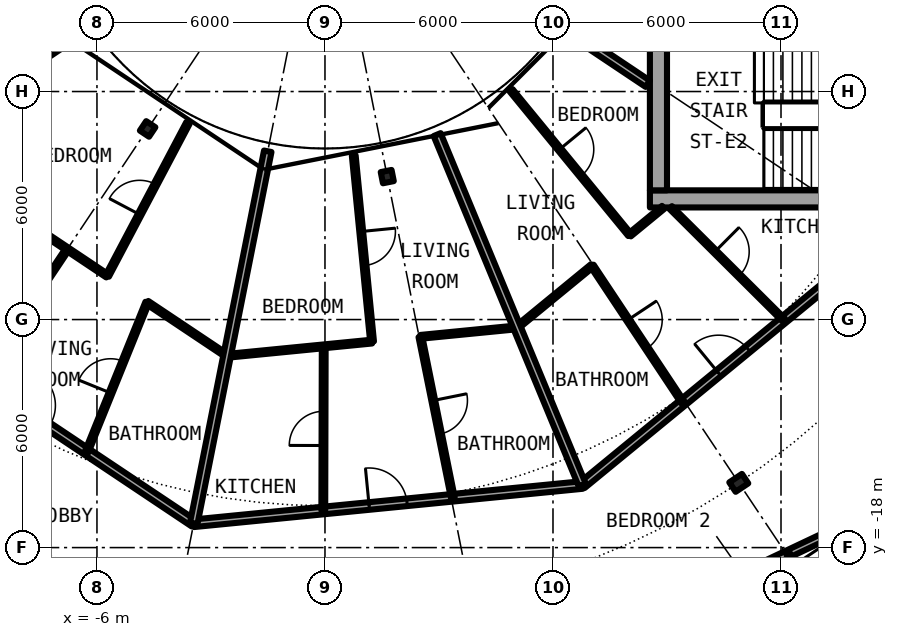
"""IFC4 building model, lengths in metres.
Left out: names, types, materials, properties, quantities, classifications, styles, units other than length and angle.
Written with IfcOpenShell. Run it as: python <this file> out.ifc"""

import sys

from ifc_helpers import new_model, si_unit, direction, frame, frame_2d, origin, origin_2d, place, context, subcontext, project, spatial, rectangle, i_section, extrude, element, fill, save


model = new_model("IFC4")
c1 = context("Model", 3, precision=1e-05, world=origin(), true_north=direction((0.0, 1.0)))
c2 = subcontext(c1, "Body", "Model", "MODEL_VIEW")
j1 = project(units=[si_unit("LENGTHUNIT", "METRE"), si_unit("PLANEANGLEUNIT", "RADIAN")], contexts=[c1])
p1 = place(None, origin())
s1 = spatial("IfcSite", under=j1, at=p1, CompositionType="ELEMENT")
p2 = place(p1, origin())
s2 = spatial("IfcBuilding", under=s1, at=p2, CompositionType="ELEMENT")
p3 = place(p2, frame((0.0, 0.0, 212.7)))
s3 = spatial("IfcBuildingStorey", under=s2, at=p3, CompositionType="ELEMENT", Elevation=212.7)
p4 = place(p3, frame((10.889, -16.297, 0.0), z_axis=(0.0, 0.0, 1.0), x_axis=(0.55557023302, -0.831469612303, 0.0)))
e1 = element("IfcColumn", 1, at=p4, inside=s3, PredefinedType="COLUMN", context=c2, shape_type="SweptSolid", body=[
    extrude(i_section(OverallWidth=0.3, OverallDepth=0.4, WebThickness=0.013, FlangeThickness=0.024, FilletRadius=0.027, at=origin_2d()), origin(), (0.0, 0.0, 1.0), 3.05),
])
for number, where, z_axis, x_axis in (
    (2, (-4.667, -6.984, 0.0), (0.0, 0.0, 1.0), (-0.556, -0.831, 0.0)),
    (3, (1.639, -8.239, 0.0), (0.0, 0.0, 1.0), (0.195, -0.981, 0.0)),
):
    element("IfcColumn", number, at=place(p3, frame(where, z_axis=z_axis, x_axis=x_axis)), inside=s3, PredefinedType="COLUMN", context=c2, shape_type="SweptSolid", body=[
        extrude(i_section(OverallWidth=0.3, OverallDepth=0.29, WebThickness=0.009, FlangeThickness=0.014, FilletRadius=0.027, at=origin_2d()), origin(), (0.0, 0.0, 1.0), 3.05),
    ])
p5 = place(p3, frame((8.55, -8.825, 0.0), z_axis=(0.0, 0.0, 1.0), x_axis=(1.0, 0.0, 0.0)))
e4 = element("IfcWall", 4, at=p5, inside=s3, PredefinedType="SHEAR", context=c2, shape_type="SweptSolid", body=[
    extrude(rectangle(XDim=13.5, YDim=0.45, at=frame_2d((6.75, 0.0))), origin(), (0.0, 0.0, 1.0), 3.05),
])
p6 = place(p5, frame((11.325, 0.0, 0.0)))
e5 = element("IfcOpeningElement", 5, at=p6, cuts=e4, PredefinedType="OPENING", context=c2, shape_type="SweptSolid", body=[
    extrude(rectangle(XDim=1.2, YDim=2.3, at=frame_2d((0.6, 1.15))), frame((0.0, 0.235, 0.0), z_axis=(0.0, -1.0, 0.0), x_axis=(1.0, 0.0, 0.0)), (0.0, 0.0, 1.0), 0.47),
])
p7 = place(p3, frame((8.775, -8.6, 0.0), z_axis=(0.0, 0.0, 1.0), x_axis=(0.0, 1.0, 0.0)))
e6 = element("IfcWall", 6, at=p7, inside=s3, PredefinedType="SHEAR", context=c2, shape_type="SweptSolid", body=[
    extrude(rectangle(XDim=17.2, YDim=0.45, at=frame_2d((8.6, 0.0))), origin(), (0.0, 0.0, 1.0), 3.05),
])
p8 = place(p7, frame((7.4, 0.0, 0.1)))
e7 = element("IfcOpeningElement", 7, at=p8, cuts=e6, PredefinedType="OPENING", context=c2, shape_type="SweptSolid", body=[
    extrude(rectangle(XDim=2.4, YDim=2.2, at=frame_2d((1.2, 1.1))), frame((0.0, 0.235, 0.0), z_axis=(0.0, -1.0, 0.0), x_axis=(1.0, 0.0, 0.0)), (0.0, 0.0, 1.0), 0.47),
])
p9 = place(p3, frame((4.352, -21.873, 0.0), z_axis=(0.0, 0.0, 1.0), x_axis=(0.903903349022, 0.427736759733, 0.0)))
e8 = element("IfcWall", 8, at=p9, inside=s3, PredefinedType="PARTITIONING", context=c2, shape_type="SweptSolid", body=[
    extrude(rectangle(XDim=10.838, YDim=0.2, at=frame_2d((5.419, 0.0))), origin(), (0.0, 0.0, 1.0), 2.7),
])
p10 = place(p9, frame((4.92, 0.0, 0.0)))
e9 = element("IfcOpeningElement", 9, at=p10, cuts=e8, PredefinedType="OPENING", context=c2, shape_type="SweptSolid", body=[
    extrude(rectangle(XDim=1.0, YDim=2.3, at=frame_2d((0.5, 1.15))), frame((0.0, 0.11, 0.0), z_axis=(0.0, -1.0, 0.0), x_axis=(1.0, 0.0, 0.0)), (0.0, 0.0, 1.0), 0.22),
])
p11 = place(p3, frame((-3.454, -17.36, 0.0), z_axis=(0.0, 0.0, 1.0), x_axis=(0.995189328429, 0.097970406658, 0.0)))
e10 = element("IfcWall", 10, at=p11, inside=s3, PredefinedType="PARTITIONING", context=c2, shape_type="SweptSolid", body=[
    extrude(rectangle(XDim=10.28, YDim=0.2, at=frame_2d((5.14, 0.0))), origin(), (0.0, 0.0, 1.0), 2.7),
])
p12 = place(p11, frame((4.639, 0.0, 0.0)))
e11 = element("IfcOpeningElement", 11, at=p12, cuts=e10, PredefinedType="OPENING", context=c2, shape_type="SweptSolid", body=[
    extrude(rectangle(XDim=1.0, YDim=2.3, at=frame_2d((0.5, 1.15))), frame((0.0, 0.11, 0.0), z_axis=(0.0, -1.0, 0.0), x_axis=(1.0, 0.0, 0.0)), (0.0, 0.0, 1.0), 0.22),
])
p13 = place(p3, frame((6.773, -16.353, 0.0), z_axis=(0.0, 0.0, 1.0), x_axis=(0.773034536097, 0.634363938131, 0.0)))
e12 = element("IfcWall", 12, at=p13, inside=s3, PredefinedType="PARTITIONING", context=c2, shape_type="SweptSolid", body=[
    extrude(rectangle(XDim=10.277, YDim=0.2, at=frame_2d((5.138, 0.0))), origin(), (0.0, 0.0, 1.0), 2.7),
])
p14 = place(p13, frame((4.638, 0.0, 0.0)))
e13 = element("IfcOpeningElement", 13, at=p14, cuts=e12, PredefinedType="OPENING", context=c2, shape_type="SweptSolid", body=[
    extrude(rectangle(XDim=1.0, YDim=2.3, at=frame_2d((0.5, 1.15))), frame((0.0, 0.11, 0.0), z_axis=(0.0, -1.0, 0.0), x_axis=(1.0, 0.0, 0.0)), (0.0, 0.0, 1.0), 0.22),
])
p15 = place(p3, frame((-14.717, -9.834, 0.0), z_axis=(0.0, 0.0, 1.0), x_axis=(0.831492679744, -0.555535708603, 0.0)))
e14 = element("IfcWall", 14, at=p15, inside=s3, PredefinedType="PARTITIONING", context=c2, shape_type="SweptSolid", body=[
    extrude(rectangle(XDim=13.549, YDim=0.2, at=frame_2d((6.775, 0.0))), origin(), (0.0, 0.0, 1.0), 2.7),
])
p16 = place(p15, frame((7.966, 0.0, 0.0)))
e15 = element("IfcOpeningElement", 15, at=p16, cuts=e14, PredefinedType="OPENING", context=c2, shape_type="SweptSolid", body=[
    extrude(rectangle(XDim=1.0, YDim=2.3, at=frame_2d((0.5, 1.15))), frame((0.0, 0.11, 0.0), z_axis=(0.0, -1.0, 0.0), x_axis=(1.0, 0.0, 0.0)), (0.0, 0.0, 1.0), 0.22),
])
p17 = place(p3, frame((-2.58, -12.955, 0.0), z_axis=(0.0, 0.0, 1.0), x_axis=(0.995206557747, 0.097795232084, 0.0)))
e16 = element("IfcWall", 16, at=p17, inside=s3, PredefinedType="PARTITIONING", context=c2, shape_type="SweptSolid", body=[
    extrude(rectangle(XDim=3.834, YDim=0.1, at=frame_2d((1.917, 0.0))), origin(), (0.0, 0.0, 1.0), 2.7),
])
p18 = place(p3, frame((2.511, -12.455, 0.0), z_axis=(0.0, 0.0, 1.0), x_axis=(0.995205948766, 0.09780142913, 0.0)))
e17 = element("IfcWall", 17, at=p18, inside=s3, PredefinedType="PARTITIONING", context=c2, shape_type="SweptSolid", body=[
    extrude(rectangle(XDim=2.556, YDim=0.1, at=frame_2d((1.278, 0.0))), origin(), (0.0, 0.0, 1.0), 2.7),
])
p19 = place(p3, frame((5.055, -12.204, 0.0), z_axis=(0.0, 0.0, 1.0), x_axis=(0.772943675046, 0.634474645046, 0.0)))
e18 = element("IfcWall", 18, at=p19, inside=s3, PredefinedType="PARTITIONING", context=c2, shape_type="SweptSolid", body=[
    extrude(rectangle(XDim=2.557, YDim=0.1, at=frame_2d((1.278, 0.0))), origin(), (0.0, 0.0, 1.0), 2.7),
])
p20 = place(p3, frame((8.017, -9.773, 0.0), z_axis=(0.0, 0.0, 1.0), x_axis=(0.772786083133, 0.634666581534, 0.0)))
e19 = element("IfcWall", 19, at=p20, inside=s3, PredefinedType="PARTITIONING", context=c2, shape_type="SweptSolid", body=[
    extrude(rectangle(XDim=1.144, YDim=0.1, at=frame_2d((0.572, 0.0))), origin(), (0.0, 0.0, 1.0), 2.7),
])
p21 = place(p3, frame((-8.549, -8.965, 0.0), z_axis=(0.0, 0.0, 1.0), x_axis=(0.831463102602, -0.555579975352, 0.0)))
e20 = element("IfcWall", 20, at=p21, inside=s3, PredefinedType="PARTITIONING", context=c2, shape_type="SweptSolid", body=[
    extrude(rectangle(XDim=3.393, YDim=0.1, at=frame_2d((1.696, 0.0))), origin(), (0.0, 0.0, 1.0), 2.7),
])
p22 = place(p3, frame((-4.677, -11.552, 0.0), z_axis=(0.0, 0.0, 1.0), x_axis=(0.83155963659, -0.555435478517, 0.0)))
e21 = element("IfcWall", 21, at=p22, inside=s3, PredefinedType="PARTITIONING", context=c2, shape_type="SweptSolid", body=[
    extrude(rectangle(XDim=2.528, YDim=0.1, at=frame_2d((1.264, 0.0))), origin(), (0.0, 0.0, 1.0), 2.7),
])
for number, where, z_axis, x_axis in (
    (22, (-6.513, -4.472, 0.0), (0.0, 0.0, 1.0), (-0.831, -0.556, 0.0)),
    (23, (6.513, -4.472, 0.0), (0.0, 0.0, 1.0), (0.831, -0.556, 0.0)),
):
    element("IfcWall", number, at=place(p3, frame(where, z_axis=z_axis, x_axis=x_axis)), inside=s3, PredefinedType="PARTITIONING", context=c2, shape_type="SweptSolid", body=[
        extrude(rectangle(XDim=2.383, YDim=0.2, at=frame_2d((1.191, 0.0))), origin(), (0.0, 0.0, 1.0), 2.7),
    ])
p23 = place(p3, frame((-9.085, -13.597, 0.0), z_axis=(0.0, 0.0, 1.0), x_axis=(0.555528237031, 0.831497671591, 0.0)))
e24 = element("IfcWall", 24, at=p23, inside=s3, PredefinedType="PARTITIONING", context=c2, shape_type="SweptSolid", body=[
    extrude(rectangle(XDim=4.149, YDim=0.1, at=frame_2d((2.075, 0.0))), origin(), (0.0, 0.0, 1.0), 2.7),
])
p24 = place(p23, frame((1.625, 0.0, 0.0)))
e25 = element("IfcOpeningElement", 25, at=p24, cuts=e24, PredefinedType="OPENING", context=c2, shape_type="SweptSolid", body=[
    extrude(rectangle(XDim=0.9, YDim=2.3, at=frame_2d((0.45, 1.15))), frame((0.0, 0.06, 0.0), z_axis=(0.0, -1.0, 0.0), x_axis=(1.0, 0.0, 0.0)), (0.0, 0.0, 1.0), 0.12),
])
p25 = place(p3, frame((-6.269, -15.478, 0.0), z_axis=(0.0, 0.0, 1.0), x_axis=(0.375509828455, 0.926818411952, 0.0)))
e26 = element("IfcWall", 26, at=p25, inside=s3, PredefinedType="PARTITIONING", context=c2, shape_type="SweptSolid", body=[
    extrude(rectangle(XDim=4.237, YDim=0.1, at=frame_2d((2.119, 0.0))), origin(), (0.0, 0.0, 1.0), 2.7),
])
p26 = place(p25, frame((1.669, 0.0, 0.0)))
e27 = element("IfcOpeningElement", 27, at=p26, cuts=e26, PredefinedType="OPENING", context=c2, shape_type="SweptSolid", body=[
    extrude(rectangle(XDim=0.9, YDim=2.3, at=frame_2d((0.45, 1.15))), frame((0.0, 0.06, 0.0), z_axis=(0.0, -1.0, 0.0), x_axis=(1.0, 0.0, 0.0)), (0.0, 0.0, 1.0), 0.12),
])
p27 = place(p3, frame((-5.729, -10.849, 0.0), z_axis=(0.0, 0.0, 1.0), x_axis=(0.466962677975, 0.884277025246, 0.0)))
e28 = element("IfcWall", 28, at=p27, inside=s3, PredefinedType="PARTITIONING", context=c2, shape_type="SweptSolid", body=[
    extrude(rectangle(XDim=4.549, YDim=0.1, at=frame_2d((2.274, 0.0))), origin(), (0.0, 0.0, 1.0), 2.7),
])
p28 = place(p27, frame((1.824, 0.0, 0.0)))
e29 = element("IfcOpeningElement", 29, at=p28, cuts=e28, PredefinedType="OPENING", context=c2, shape_type="SweptSolid", body=[
    extrude(rectangle(XDim=0.9, YDim=2.3, at=frame_2d((0.45, 1.15))), frame((0.0, 0.06, 0.0), z_axis=(0.0, -1.0, 0.0), x_axis=(1.0, 0.0, 0.0)), (0.0, 0.0, 1.0), 0.12),
])
p29 = place(p3, frame((-3.453, -17.36, 0.0), z_axis=(0.0, 0.0, 1.0), x_axis=(0.19507162238, 0.980788999807, 0.0)))
e30 = element("IfcWall", 30, at=p29, inside=s3, PredefinedType="PARTITIONING", context=c2, shape_type="SweptSolid", body=[
    extrude(rectangle(XDim=9.98, YDim=0.2, at=frame_2d((4.99, 0.0))), origin(), (0.0, 0.0, 1.0), 2.7),
])
p30 = place(p3, frame((-0.044, -17.024, 0.0), z_axis=(0.0, 0.0, 1.0), x_axis=(0.002543801832, 0.999996764531, 0.0)))
e31 = element("IfcWall", 31, at=p30, inside=s3, PredefinedType="PARTITIONING", context=c2, shape_type="SweptSolid", body=[
    extrude(rectangle(XDim=4.319, YDim=0.1, at=frame_2d((2.159, 0.0))), origin(), (0.0, 0.0, 1.0), 2.7),
])
p31 = place(p30, frame((1.71, 0.0, 0.0)))
e32 = element("IfcOpeningElement", 32, at=p31, cuts=e31, PredefinedType="OPENING", context=c2, shape_type="SweptSolid", body=[
    extrude(rectangle(XDim=0.9, YDim=2.3, at=frame_2d((0.45, 1.15))), frame((0.0, 0.06, 0.0), z_axis=(0.0, -1.0, 0.0), x_axis=(1.0, 0.0, 0.0)), (0.0, 0.0, 1.0), 0.12),
])
p32 = place(p3, frame((0.757, -7.683, 0.0), z_axis=(0.0, 0.0, 1.0), x_axis=(0.097960786067, -0.995190275472, 0.0)))
e33 = element("IfcWall", 33, at=p32, inside=s3, PredefinedType="PARTITIONING", context=c2, shape_type="SweptSolid", body=[
    extrude(rectangle(XDim=4.92, YDim=0.1, at=frame_2d((2.46, 0.0))), origin(), (0.0, 0.0, 1.0), 2.7),
])
p33 = place(p32, frame((2.01, 0.0, 0.0)))
e34 = element("IfcOpeningElement", 34, at=p33, cuts=e33, PredefinedType="OPENING", context=c2, shape_type="SweptSolid", body=[
    extrude(rectangle(XDim=0.9, YDim=2.3, at=frame_2d((0.45, 1.15))), frame((0.0, 0.06, 0.0), z_axis=(0.0, -1.0, 0.0), x_axis=(1.0, 0.0, 0.0)), (0.0, 0.0, 1.0), 0.12),
])
p34 = place(p3, frame((2.511, -12.454, 0.0), z_axis=(0.0, 0.0, 1.0), x_axis=(0.197724661373, -0.980257597923, 0.0)))
e35 = element("IfcWall", 35, at=p34, inside=s3, PredefinedType="PARTITIONING", context=c2, shape_type="SweptSolid", body=[
    extrude(rectangle(XDim=4.319, YDim=0.1, at=frame_2d((2.16, 0.0))), origin(), (0.0, 0.0, 1.0), 2.7),
])
p35 = place(p34, frame((1.71, 0.0, 0.0)))
e36 = element("IfcOpeningElement", 36, at=p35, cuts=e35, PredefinedType="OPENING", context=c2, shape_type="SweptSolid", body=[
    extrude(rectangle(XDim=0.9, YDim=2.3, at=frame_2d((0.45, 1.15))), frame((0.0, 0.06, 0.0), z_axis=(0.0, -1.0, 0.0), x_axis=(1.0, 0.0, 0.0)), (0.0, 0.0, 1.0), 0.12),
])
p36 = place(p3, frame((2.952, -7.133, 0.0), z_axis=(0.0, 0.0, 1.0), x_axis=(0.382570007985, -0.923926506271, 0.0)))
e37 = element("IfcWall", 37, at=p36, inside=s3, PredefinedType="PARTITIONING", context=c2, shape_type="SweptSolid", body=[
    extrude(rectangle(XDim=9.98, YDim=0.2, at=frame_2d((4.99, 0.0))), origin(), (0.0, 0.0, 1.0), 2.7),
])
p37 = place(p3, frame((4.898, -5.968, 0.0), z_axis=(0.0, 0.0, 1.0), x_axis=(0.634401778971, -0.773003481776, 0.0)))
e38 = element("IfcWall", 38, at=p37, inside=s3, PredefinedType="PARTITIONING", context=c2, shape_type="SweptSolid", body=[
    extrude(rectangle(XDim=4.92, YDim=0.1, at=frame_2d((2.46, 0.0))), origin(), (0.0, 0.0, 1.0), 2.7),
])
p38 = place(p37, frame((2.01, 0.0, 0.0)))
e39 = element("IfcOpeningElement", 39, at=p38, cuts=e38, PredefinedType="OPENING", context=c2, shape_type="SweptSolid", body=[
    extrude(rectangle(XDim=0.9, YDim=2.3, at=frame_2d((0.45, 1.15))), frame((0.0, 0.06, 0.0), z_axis=(0.0, -1.0, 0.0), x_axis=(1.0, 0.0, 0.0)), (0.0, 0.0, 1.0), 0.12),
])
p39 = place(p3, frame((7.028, -10.584, 0.0), z_axis=(0.0, 0.0, 1.0), x_axis=(0.553303732327, -0.832979579457, 0.0)))
e40 = element("IfcWall", 40, at=p39, inside=s3, PredefinedType="PARTITIONING", context=c2, shape_type="SweptSolid", body=[
    extrude(rectangle(XDim=4.319, YDim=0.1, at=frame_2d((2.16, 0.0))), origin(), (0.0, 0.0, 1.0), 2.7),
])
p40 = place(p39, frame((1.71, 0.0, 0.0)))
e41 = element("IfcOpeningElement", 41, at=p40, cuts=e40, PredefinedType="OPENING", context=c2, shape_type="SweptSolid", body=[
    extrude(rectangle(XDim=0.9, YDim=2.3, at=frame_2d((0.45, 1.15))), frame((0.0, 0.06, 0.0), z_axis=(0.0, -1.0, 0.0), x_axis=(1.0, 0.0, 0.0)), (0.0, 0.0, 1.0), 0.12),
])
p41 = place(p3, frame((9.096, -9.051, 0.0), z_axis=(0.0, 0.0, 1.0), x_axis=(0.708909651863, -0.705299302067, 0.0)))
e42 = element("IfcWall", 42, at=p41, inside=s3, PredefinedType="PARTITIONING", context=c2, shape_type="SweptSolid", body=[
    extrude(rectangle(XDim=4.193, YDim=0.1, at=frame_2d((2.096, 0.0))), origin(), (0.0, 0.0, 1.0), 2.7),
])
p42 = place(p41, frame((1.646, 0.0, 0.0)))
e43 = element("IfcOpeningElement", 43, at=p42, cuts=e42, PredefinedType="OPENING", context=c2, shape_type="SweptSolid", body=[
    extrude(rectangle(XDim=0.9, YDim=2.3, at=frame_2d((0.45, 1.15))), frame((0.0, 0.06, 0.0), z_axis=(0.0, -1.0, 0.0), x_axis=(1.0, 0.0, 0.0)), (0.0, 0.0, 1.0), 0.12),
])
p43 = place(p3, frame((12.188, -18.165, 0.0), z_axis=(0.0, 0.0, 1.0), x_axis=(0.557206464517, -0.830373985564, 0.0)))
e44 = element("IfcWall", 44, at=p43, inside=s3, PredefinedType="PARTITIONING", context=c2, shape_type="SweptSolid", body=[
    extrude(rectangle(XDim=5.3, YDim=0.1, at=frame_2d((2.65, 0.0))), origin(), (0.0, 0.0, 1.0), 2.7),
])
p44 = place(p43, frame((0.334, 0.0, 0.0)))
e45 = element("IfcOpeningElement", 45, at=p44, cuts=e44, PredefinedType="OPENING", context=c2, shape_type="SweptSolid", body=[
    extrude(rectangle(XDim=0.9, YDim=2.3, at=frame_2d((0.45, 1.15))), frame((0.0, 0.06, 0.0), z_axis=(0.0, -1.0, 0.0), x_axis=(1.0, 0.0, 0.0)), (0.0, 0.0, 1.0), 0.12),
])
p45 = place(p43, frame((2.984, 0.0, 0.0)))
e46 = element("IfcOpeningElement", 46, at=p45, cuts=e44, PredefinedType="OPENING", context=c2, shape_type="SweptSolid", body=[
    extrude(rectangle(XDim=0.9, YDim=2.3, at=frame_2d((0.45, 1.15))), frame((0.0, 0.06, 0.0), z_axis=(0.0, -1.0, 0.0), x_axis=(1.0, 0.0, 0.0)), (0.0, 0.0, 1.0), 0.12),
])
p46 = place(p26, origin())
e47 = element("IfcDoor", 47, at=p46, inside=s3, OperationType="SINGLE_SWING_LEFT", PredefinedType="DOOR", context=c2, shape_type="SweptSolid", body=[
    extrude(rectangle(XDim=0.9, YDim=2.3, at=frame_2d((0.45, 1.15))), frame((0.0, 0.025, 0.0), z_axis=(0.0, -1.0, 0.0), x_axis=(1.0, 0.0, 0.0)), (0.0, 0.0, 1.0), 0.05),
])
fill(e27, e47)
p47 = place(p28, origin())
e48 = element("IfcDoor", 48, at=p47, inside=s3, OperationType="SINGLE_SWING_RIGHT", PredefinedType="DOOR", context=c2, shape_type="SweptSolid", body=[
    extrude(rectangle(XDim=0.9, YDim=2.3, at=frame_2d((0.45, 1.15))), frame((0.0, 0.025, 0.0), z_axis=(0.0, -1.0, 0.0), x_axis=(1.0, 0.0, 0.0)), (0.0, 0.0, 1.0), 0.05),
])
fill(e29, e48)
p48 = place(p12, origin())
e49 = element("IfcDoor", 49, at=p48, inside=s3, OperationType="SINGLE_SWING_LEFT", PredefinedType="DOOR", context=c2, shape_type="SweptSolid", body=[
    extrude(rectangle(XDim=1.0, YDim=2.3, at=frame_2d((0.5, 1.15))), frame((0.0, 0.025, 0.0), z_axis=(0.0, -1.0, 0.0), x_axis=(1.0, 0.0, 0.0)), (0.0, 0.0, 1.0), 0.05),
])
fill(e11, e49)
p49 = place(p35, origin())
e50 = element("IfcDoor", 50, at=p49, inside=s3, OperationType="SINGLE_SWING_LEFT", PredefinedType="DOOR", context=c2, shape_type="SweptSolid", body=[
    extrude(rectangle(XDim=0.9, YDim=2.3, at=frame_2d((0.45, 1.15))), frame((0.0, 0.025, 0.0), z_axis=(0.0, -1.0, 0.0), x_axis=(1.0, 0.0, 0.0)), (0.0, 0.0, 1.0), 0.05),
])
fill(e36, e50)
p50 = place(p31, origin())
e51 = element("IfcDoor", 51, at=p50, inside=s3, OperationType="SINGLE_SWING_LEFT", PredefinedType="DOOR", context=c2, shape_type="SweptSolid", body=[
    extrude(rectangle(XDim=0.9, YDim=2.3, at=frame_2d((0.45, 1.15))), frame((0.0, 0.025, 0.0), z_axis=(0.0, -1.0, 0.0), x_axis=(1.0, 0.0, 0.0)), (0.0, 0.0, 1.0), 0.05),
])
fill(e32, e51)
p51 = place(p33, origin())
e52 = element("IfcDoor", 52, at=p51, inside=s3, OperationType="SINGLE_SWING_LEFT", PredefinedType="DOOR", context=c2, shape_type="SweptSolid", body=[
    extrude(rectangle(XDim=0.9, YDim=2.3, at=frame_2d((0.45, 1.15))), frame((0.0, 0.025, 0.0), z_axis=(0.0, -1.0, 0.0), x_axis=(1.0, 0.0, 0.0)), (0.0, 0.0, 1.0), 0.05),
])
fill(e34, e52)
p52 = place(p14, origin())
e53 = element("IfcDoor", 53, at=p52, inside=s3, OperationType="SINGLE_SWING_RIGHT", PredefinedType="DOOR", context=c2, shape_type="SweptSolid", body=[
    extrude(rectangle(XDim=1.0, YDim=2.3, at=frame_2d((0.5, 1.15))), frame((0.0, 0.025, 0.0), z_axis=(0.0, -1.0, 0.0), x_axis=(1.0, 0.0, 0.0)), (0.0, 0.0, 1.0), 0.05),
])
fill(e13, e53)
p53 = place(p40, origin())
e54 = element("IfcDoor", 54, at=p53, inside=s3, OperationType="SINGLE_SWING_LEFT", PredefinedType="DOOR", context=c2, shape_type="SweptSolid", body=[
    extrude(rectangle(XDim=0.9, YDim=2.3, at=frame_2d((0.45, 1.15))), frame((0.0, 0.025, 0.0), z_axis=(0.0, -1.0, 0.0), x_axis=(1.0, 0.0, 0.0)), (0.0, 0.0, 1.0), 0.05),
])
fill(e41, e54)
p54 = place(p42, origin())
e55 = element("IfcDoor", 55, at=p54, inside=s3, OperationType="SINGLE_SWING_RIGHT", PredefinedType="DOOR", context=c2, shape_type="SweptSolid", body=[
    extrude(rectangle(XDim=0.9, YDim=2.3, at=frame_2d((0.45, 1.15))), frame((0.0, 0.025, 0.0), z_axis=(0.0, -1.0, 0.0), x_axis=(1.0, 0.0, 0.0)), (0.0, 0.0, 1.0), 0.05),
])
fill(e43, e55)
p55 = place(p38, origin())
e56 = element("IfcDoor", 56, at=p55, inside=s3, OperationType="SINGLE_SWING_RIGHT", PredefinedType="DOOR", context=c2, shape_type="SweptSolid", body=[
    extrude(rectangle(XDim=0.9, YDim=2.3, at=frame_2d((0.45, 1.15))), frame((0.0, 0.025, 0.0), z_axis=(0.0, -1.0, 0.0), x_axis=(1.0, 0.0, 0.0)), (0.0, 0.0, 1.0), 0.05),
])
fill(e39, e56)
save(model, sys.argv[1])
